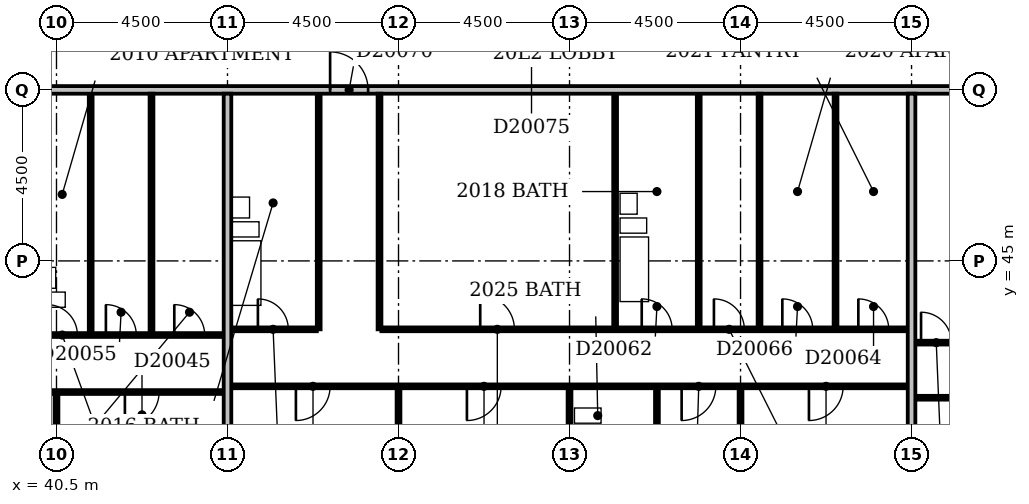
"""IFC4 building model, lengths in metres.
Left out: names, types, materials, properties, quantities, classifications, styles, units other than length and angle.
Written with IfcOpenShell. Run it as: python <this file> out.ifc"""

import sys

from ifc_helpers import new_model, si_unit, direction, frame, frame_2d, origin, place, context, subcontext, project, spatial, rectangle, extrude, element, fill, save


model = new_model("IFC4")
c1 = context("Model", 3, precision=1e-05, world=origin(), true_north=direction((0.0, 1.0)))
c2 = subcontext(c1, "Body", "Model", "MODEL_VIEW")
j1 = project(units=[si_unit("LENGTHUNIT", "METRE"), si_unit("PLANEANGLEUNIT", "RADIAN")], contexts=[c1])
p1 = place(None, origin())
s1 = spatial("IfcSite", under=j1, at=p1, CompositionType="ELEMENT")
p2 = place(p1, origin())
s2 = spatial("IfcBuilding", under=s1, at=p2, CompositionType="ELEMENT")
p3 = place(p2, frame((0.0, 0.0, 83.0)))
s3 = spatial("IfcBuildingStorey", under=s2, at=p3, CompositionType="ELEMENT", Elevation=83.0)
p4 = place(p3, frame((40.5, 36.6, 0.0), z_axis=(0.0, 0.0, 1.0), x_axis=(0.0, 1.0, 0.0)))
e1 = element("IfcWall", 1, at=p4, inside=s3, PredefinedType="PARTITIONING", context=c2, shape_type="SweptSolid", body=[
    extrude(rectangle(XDim=4.9, YDim=0.1, at=frame_2d((2.45, 0.0))), origin(), (0.0, 0.0, 1.0), 3.3),
])
p5 = place(p3, frame((45.0, 36.6, 0.0), z_axis=(0.0, 0.0, 1.0), x_axis=(0.0, 1.0, 0.0)))
e2 = element("IfcWall", 2, at=p5, inside=s3, PredefinedType="PARTITIONING", context=c2, shape_type="SweptSolid", body=[
    extrude(rectangle(XDim=12.8, YDim=0.2, at=frame_2d((6.4, 0.0))), origin(), (0.0, 0.0, 1.0), 2.6),
])
p6 = place(p3, frame((49.5, 36.6, 0.0), z_axis=(0.0, 0.0, 1.0), x_axis=(0.0, 1.0, 0.0)))
e3 = element("IfcWall", 3, at=p6, inside=s3, PredefinedType="PARTITIONING", context=c2, shape_type="SweptSolid", body=[
    extrude(rectangle(XDim=5.05, YDim=0.1, at=frame_2d((2.525, 0.0))), origin(), (0.0, 0.0, 1.0), 3.3),
])
p7 = place(p3, frame((54.0, 36.6, 0.0), z_axis=(0.0, 0.0, 1.0), x_axis=(0.0, 1.0, 0.0)))
e4 = element("IfcWall", 4, at=p7, inside=s3, PredefinedType="PARTITIONING", context=c2, shape_type="SweptSolid", body=[
    extrude(rectangle(XDim=5.05, YDim=0.1, at=frame_2d((2.525, 0.0))), origin(), (0.0, 0.0, 1.0), 2.6),
])
p8 = place(p3, frame((58.5, 36.6, 0.0), z_axis=(0.0, 0.0, 1.0), x_axis=(0.0, 1.0, 0.0)))
e5 = element("IfcWall", 5, at=p8, inside=s3, PredefinedType="PARTITIONING", context=c2, shape_type="SweptSolid", body=[
    extrude(rectangle(XDim=5.05, YDim=0.1, at=frame_2d((2.525, 0.0))), origin(), (0.0, 0.0, 1.0), 3.3),
])
p9 = place(p3, frame((63.0, 36.6, 0.0), z_axis=(0.0, 0.0, 1.0), x_axis=(0.0, 1.0, 0.0)))
e6 = element("IfcWall", 6, at=p9, inside=s3, PredefinedType="PARTITIONING", context=c2, shape_type="SweptSolid", body=[
    extrude(rectangle(XDim=12.8, YDim=0.2, at=frame_2d((6.4, 0.0))), origin(), (0.0, 0.0, 1.0), 2.4),
])
p10 = place(p3, frame((56.3, 38.8, 0.0), z_axis=(0.0, 0.0, 1.0), x_axis=(0.0, 1.0, 0.0)))
e7 = element("IfcWall", 7, at=p10, inside=s3, PredefinedType="PLUMBINGWALL", context=c2, shape_type="SweptSolid", body=[
    extrude(rectangle(XDim=2.85, YDim=0.1, at=frame_2d((1.425, 0.0))), origin(), (0.0, 0.0, 1.0), 3.3),
])
p11 = place(p10, frame((1.05, 0.0, 0.0)))
e8 = element("IfcOpeningElement", 8, at=p11, cuts=e7, PredefinedType="OPENING", context=c2, shape_type="SweptSolid", body=[
    extrude(rectangle(XDim=0.8, YDim=2.1, at=frame_2d((0.4, 1.05))), frame((0.0, 0.062, 0.0), z_axis=(0.0, -1.0, 0.0), x_axis=(1.0, 0.0, 0.0)), (0.0, 0.0, 1.0), 0.124),
])
p12 = place(p3, frame((63.1, 41.4, 0.0), z_axis=(0.0, 0.0, 1.0), x_axis=(1.0, 0.0, 0.0)))
e9 = element("IfcWall", 9, at=p12, inside=s3, PredefinedType="PARTITIONING", context=c2, shape_type="SweptSolid", body=[
    extrude(rectangle(XDim=5.0, YDim=0.1, at=frame_2d((2.5, 0.0))), origin(), (0.0, 0.0, 1.0), 3.3),
])
p13 = place(p12, frame((1.7, 0.0, 0.0)))
e10 = element("IfcOpeningElement", 10, at=p13, cuts=e9, PredefinedType="OPENING", context=c2, shape_type="SweptSolid", body=[
    extrude(rectangle(XDim=0.9, YDim=2.1, at=frame_2d((0.45, 1.05))), frame((0.0, 0.062, 0.0), z_axis=(0.0, -1.0, 0.0), x_axis=(1.0, 0.0, 0.0)), (0.0, 0.0, 1.0), 0.124),
])
p14 = place(p3, frame((31.6, 41.55, 0.0), z_axis=(0.0, 0.0, 1.0), x_axis=(1.0, 0.0, 0.0)))
e11 = element("IfcWall", 11, at=p14, inside=s3, PredefinedType="PARTITIONING", context=c2, shape_type="SweptSolid", body=[
    extrude(rectangle(XDim=13.3, YDim=0.1, at=frame_2d((6.65, 0.0))), origin(), (0.0, 0.0, 1.0), 3.3),
])
p15 = place(p14, frame((3.9, 0.0, 0.0)))
e12 = element("IfcOpeningElement", 12, at=p15, cuts=e11, PredefinedType="OPENING", context=c2, shape_type="SweptSolid", body=[
    extrude(rectangle(XDim=0.9, YDim=2.1, at=frame_2d((0.45, 1.05))), frame((0.0, 0.062, 0.0), z_axis=(0.0, -1.0, 0.0), x_axis=(1.0, 0.0, 0.0)), (0.0, 0.0, 1.0), 0.124),
])
p16 = place(p14, frame((10.7, 0.0, 0.0)))
e13 = element("IfcOpeningElement", 13, at=p16, cuts=e11, PredefinedType="OPENING", context=c2, shape_type="SweptSolid", body=[
    extrude(rectangle(XDim=0.9, YDim=2.1, at=frame_2d((0.45, 1.05))), frame((0.0, 0.062, 0.0), z_axis=(0.0, -1.0, 0.0), x_axis=(1.0, 0.0, 0.0)), (0.0, 0.0, 1.0), 0.124),
])
p17 = place(p3, frame((45.1, 41.7, 0.0), z_axis=(0.0, 0.0, 1.0), x_axis=(1.0, 0.0, 0.0)))
e14 = element("IfcWall", 14, at=p17, inside=s3, PredefinedType="PARTITIONING", context=c2, shape_type="SweptSolid", body=[
    extrude(rectangle(XDim=17.8, YDim=0.1, at=frame_2d((8.9, 0.0))), origin(), (0.0, 0.0, 1.0), 3.3),
])
p18 = place(p17, frame((1.7, 0.0, 0.0)))
e15 = element("IfcOpeningElement", 15, at=p18, cuts=e14, PredefinedType="OPENING", context=c2, shape_type="SweptSolid", body=[
    extrude(rectangle(XDim=0.9, YDim=2.1, at=frame_2d((0.45, 1.05))), frame((0.0, 0.062, 0.0), z_axis=(0.0, -1.0, 0.0), x_axis=(1.0, 0.0, 0.0)), (0.0, 0.0, 1.0), 0.124),
])
p19 = place(p17, frame((6.2, 0.0, 0.0)))
e16 = element("IfcOpeningElement", 16, at=p19, cuts=e14, PredefinedType="OPENING", context=c2, shape_type="SweptSolid", body=[
    extrude(rectangle(XDim=0.9, YDim=2.1, at=frame_2d((0.45, 1.05))), frame((0.0, 0.062, 0.0), z_axis=(0.0, -1.0, 0.0), x_axis=(1.0, 0.0, 0.0)), (0.0, 0.0, 1.0), 0.124),
])
p20 = place(p17, frame((11.85, 0.0, 0.0)))
e17 = element("IfcOpeningElement", 17, at=p20, cuts=e14, PredefinedType="OPENING", context=c2, shape_type="SweptSolid", body=[
    extrude(rectangle(XDim=0.9, YDim=2.1, at=frame_2d((0.45, 1.05))), frame((0.0, 0.062, 0.0), z_axis=(0.0, -1.0, 0.0), x_axis=(1.0, 0.0, 0.0)), (0.0, 0.0, 1.0), 0.124),
])
p21 = place(p17, frame((15.2, 0.0, 0.0)))
e18 = element("IfcOpeningElement", 18, at=p21, cuts=e14, PredefinedType="OPENING", context=c2, shape_type="SweptSolid", body=[
    extrude(rectangle(XDim=0.9, YDim=2.1, at=frame_2d((0.45, 1.05))), frame((0.0, 0.062, 0.0), z_axis=(0.0, -1.0, 0.0), x_axis=(1.0, 0.0, 0.0)), (0.0, 0.0, 1.0), 0.124),
])
p22 = place(p3, frame((63.1, 42.85, 0.0), z_axis=(0.0, 0.0, 1.0), x_axis=(1.0, 0.0, 0.0)))
e19 = element("IfcWall", 19, at=p22, inside=s3, PredefinedType="PARTITIONING", context=c2, shape_type="SweptSolid", body=[
    extrude(rectangle(XDim=1.15, YDim=0.1, at=frame_2d((0.575, 0.0))), origin(), (0.0, 0.0, 1.0), 3.3),
])
p23 = place(p22, frame((0.15, 0.0, 0.0)))
e20 = element("IfcOpeningElement", 20, at=p23, cuts=e19, PredefinedType="OPENING", context=c2, shape_type="SweptSolid", body=[
    extrude(rectangle(XDim=0.8, YDim=2.1, at=frame_2d((0.4, 1.05))), frame((0.0, 0.062, 0.0), z_axis=(0.0, -1.0, 0.0), x_axis=(1.0, 0.0, 0.0)), (0.0, 0.0, 1.0), 0.124),
])
p24 = place(p3, frame((33.15, 43.05, 0.0), z_axis=(0.0, 0.0, 1.0), x_axis=(1.0, 0.0, 0.0)))
e21 = element("IfcWall", 21, at=p24, inside=s3, PredefinedType="PARTITIONING", context=c2, shape_type="SweptSolid", body=[
    extrude(rectangle(XDim=11.75, YDim=0.1, at=frame_2d((5.875, 0.0))), origin(), (0.0, 0.0, 1.0), 3.3),
])
p25 = place(p24, frame((5.15, 0.0, 0.0)))
e22 = element("IfcOpeningElement", 22, at=p25, cuts=e21, PredefinedType="OPENING", context=c2, shape_type="SweptSolid", body=[
    extrude(rectangle(XDim=0.8, YDim=2.1, at=frame_2d((0.4, 1.05))), frame((0.0, 0.062, 0.0), z_axis=(0.0, -1.0, 0.0), x_axis=(1.0, 0.0, 0.0)), (0.0, 0.0, 1.0), 0.124),
])
p26 = place(p24, frame((1.7, 0.0, 0.0)))
e23 = element("IfcOpeningElement", 23, at=p26, cuts=e21, PredefinedType="OPENING", context=c2, shape_type="SweptSolid", body=[
    extrude(rectangle(XDim=0.9, YDim=2.1, at=frame_2d((0.45, 1.05))), frame((0.0, 0.062, 0.0), z_axis=(0.0, -1.0, 0.0), x_axis=(1.0, 0.0, 0.0)), (0.0, 0.0, 1.0), 0.124),
])
p27 = place(p24, frame((8.65, 0.0, 0.0)))
e24 = element("IfcOpeningElement", 24, at=p27, cuts=e21, PredefinedType="OPENING", context=c2, shape_type="SweptSolid", body=[
    extrude(rectangle(XDim=0.8, YDim=2.1, at=frame_2d((0.4, 1.05))), frame((0.0, 0.062, 0.0), z_axis=(0.0, -1.0, 0.0), x_axis=(1.0, 0.0, 0.0)), (0.0, 0.0, 1.0), 0.124),
])
p28 = place(p24, frame((10.45, 0.0, 0.0)))
e25 = element("IfcOpeningElement", 25, at=p28, cuts=e21, PredefinedType="OPENING", context=c2, shape_type="SweptSolid", body=[
    extrude(rectangle(XDim=0.8, YDim=2.1, at=frame_2d((0.4, 1.05))), frame((0.0, 0.062, 0.0), z_axis=(0.0, -1.0, 0.0), x_axis=(1.0, 0.0, 0.0)), (0.0, 0.0, 1.0), 0.124),
])
p29 = place(p24, frame((7.1, 0.0, 0.0)))
e26 = element("IfcOpeningElement", 26, at=p29, cuts=e21, PredefinedType="OPENING", context=c2, shape_type="SweptSolid", body=[
    extrude(rectangle(XDim=0.8, YDim=2.1, at=frame_2d((0.4, 1.05))), frame((0.0, 0.062, 0.0), z_axis=(0.0, -1.0, 0.0), x_axis=(1.0, 0.0, 0.0)), (0.0, 0.0, 1.0), 0.124),
])
p30 = place(p3, frame((41.4, 43.1, 0.0), z_axis=(0.0, 0.0, 1.0), x_axis=(0.0, 1.0, 0.0)))
e27 = element("IfcWall", 27, at=p30, inside=s3, PredefinedType="PLUMBINGWALL", context=c2, shape_type="SweptSolid", body=[
    extrude(rectangle(XDim=6.3, YDim=0.1, at=frame_2d((3.15, 0.0))), origin(), (0.0, 0.0, 1.0), 3.3),
])
p31 = place(p3, frame((43.0, 43.1, 0.0), z_axis=(0.0, 0.0, 1.0), x_axis=(0.0, 1.0, 0.0)))
e28 = element("IfcWall", 28, at=p31, inside=s3, PredefinedType="PARTITIONING", context=c2, shape_type="SweptSolid", body=[
    extrude(rectangle(XDim=6.3, YDim=0.1, at=frame_2d((3.15, 0.0))), origin(), (0.0, 0.0, 1.0), 3.3),
])
p32 = place(p3, frame((45.1, 43.2, 0.0), z_axis=(0.0, 0.0, 1.0), x_axis=(1.0, 0.0, 0.0)))
e29 = element("IfcWall", 29, at=p32, inside=s3, PredefinedType="PARTITIONING", context=c2, shape_type="SweptSolid", body=[
    extrude(rectangle(XDim=2.25, YDim=0.1, at=frame_2d((1.125, 0.0))), origin(), (0.0, 0.0, 1.0), 3.3),
])
p33 = place(p32, frame((0.7, 0.0, 0.0)))
e30 = element("IfcOpeningElement", 30, at=p33, cuts=e29, PredefinedType="OPENING", context=c2, shape_type="SweptSolid", body=[
    extrude(rectangle(XDim=0.8, YDim=2.1, at=frame_2d((0.4, 1.05))), frame((0.0, 0.062, 0.0), z_axis=(0.0, -1.0, 0.0), x_axis=(1.0, 0.0, 0.0)), (0.0, 0.0, 1.0), 0.124),
])
p34 = place(p3, frame((47.4, 43.2, 0.0), z_axis=(0.0, 0.0, 1.0), x_axis=(0.0, 1.0, 0.0)))
e31 = element("IfcWall", 31, at=p34, inside=s3, PredefinedType="PLUMBINGWALL", context=c2, shape_type="SweptSolid", body=[
    extrude(rectangle(XDim=6.2, YDim=0.1, at=frame_2d((3.1, 0.0))), origin(), (0.0, 0.0, 1.0), 3.3),
])
p35 = place(p3, frame((49.0, 43.2, 0.0), z_axis=(0.0, 0.0, 1.0), x_axis=(0.0, 1.0, 0.0)))
e32 = element("IfcWall", 32, at=p35, inside=s3, PredefinedType="PARTITIONING", context=c2, shape_type="SweptSolid", body=[
    extrude(rectangle(XDim=6.2, YDim=0.1, at=frame_2d((3.1, 0.0))), origin(), (0.0, 0.0, 1.0), 3.3),
])
p36 = place(p3, frame((49.05, 43.2, 0.0), z_axis=(0.0, 0.0, 1.0), x_axis=(1.0, 0.0, 0.0)))
e33 = element("IfcWall", 33, at=p36, inside=s3, PredefinedType="PARTITIONING", context=c2, shape_type="SweptSolid", body=[
    extrude(rectangle(XDim=13.85, YDim=0.1, at=frame_2d((6.925, 0.0))), origin(), (0.0, 0.0, 1.0), 3.3),
])
p37 = place(p36, frame((6.85, 0.0, 0.0)))
e34 = element("IfcOpeningElement", 34, at=p37, cuts=e33, PredefinedType="OPENING", context=c2, shape_type="SweptSolid", body=[
    extrude(rectangle(XDim=0.8, YDim=2.1, at=frame_2d((0.4, 1.05))), frame((0.0, 0.062, 0.0), z_axis=(0.0, -1.0, 0.0), x_axis=(1.0, 0.0, 0.0)), (0.0, 0.0, 1.0), 0.124),
])
p38 = place(p36, frame((2.6, 0.0, 0.0)))
e35 = element("IfcOpeningElement", 35, at=p38, cuts=e33, PredefinedType="OPENING", context=c2, shape_type="SweptSolid", body=[
    extrude(rectangle(XDim=0.9, YDim=2.1, at=frame_2d((0.45, 1.05))), frame((0.0, 0.062, 0.0), z_axis=(0.0, -1.0, 0.0), x_axis=(1.0, 0.0, 0.0)), (0.0, 0.0, 1.0), 0.124),
])
p39 = place(p36, frame((12.55, 0.0, 0.0)))
e36 = element("IfcOpeningElement", 36, at=p39, cuts=e33, PredefinedType="OPENING", context=c2, shape_type="SweptSolid", body=[
    extrude(rectangle(XDim=0.8, YDim=2.1, at=frame_2d((0.4, 1.05))), frame((0.0, 0.062, 0.0), z_axis=(0.0, -1.0, 0.0), x_axis=(1.0, 0.0, 0.0)), (0.0, 0.0, 1.0), 0.124),
])
p40 = place(p36, frame((8.75, 0.0, 0.0)))
e37 = element("IfcOpeningElement", 37, at=p40, cuts=e33, PredefinedType="OPENING", context=c2, shape_type="SweptSolid", body=[
    extrude(rectangle(XDim=0.8, YDim=2.1, at=frame_2d((0.4, 1.05))), frame((0.0, 0.062, 0.0), z_axis=(0.0, -1.0, 0.0), x_axis=(1.0, 0.0, 0.0)), (0.0, 0.0, 1.0), 0.124),
])
p41 = place(p36, frame((10.55, 0.0, 0.0)))
e38 = element("IfcOpeningElement", 38, at=p41, cuts=e33, PredefinedType="OPENING", context=c2, shape_type="SweptSolid", body=[
    extrude(rectangle(XDim=0.8, YDim=2.1, at=frame_2d((0.4, 1.05))), frame((0.0, 0.062, 0.0), z_axis=(0.0, -1.0, 0.0), x_axis=(1.0, 0.0, 0.0)), (0.0, 0.0, 1.0), 0.124),
])
for number, where, z_axis, x_axis in (
    (39, (55.2, 43.25, 0.0), (0.0, 0.0, 1.0), (0.0, 1.0, 0.0)),
    (40, (57.4, 43.25, 0.0), (0.0, 0.0, 1.0), (0.0, 1.0, 0.0)),
):
    element("IfcWall", number, at=place(p3, frame(where, z_axis=z_axis, x_axis=x_axis)), inside=s3, PredefinedType="PLUMBINGWALL", context=c2, shape_type="SweptSolid", body=[
        extrude(rectangle(XDim=6.15, YDim=0.1, at=frame_2d((3.075, 0.0))), origin(), (0.0, 0.0, 1.0), 3.3),
    ])
for number, where, z_axis, x_axis in (
    (41, (59.0, 43.25, 0.0), (0.0, 0.0, 1.0), (0.0, 1.0, 0.0)),
    (42, (61.0, 43.25, 0.0), (0.0, 0.0, 1.0), (0.0, 1.0, 0.0)),
):
    element("IfcWall", number, at=place(p3, frame(where, z_axis=z_axis, x_axis=x_axis)), inside=s3, PredefinedType="PARTITIONING", context=c2, shape_type="SweptSolid", body=[
        extrude(rectangle(XDim=6.15, YDim=0.1, at=frame_2d((3.075, 0.0))), origin(), (0.0, 0.0, 1.0), 3.3),
    ])
p42 = place(p3, frame((9.1, 49.5, 0.0), z_axis=(0.0, 0.0, 1.0), x_axis=(1.0, 0.0, 0.0)))
e43 = element("IfcWall", 43, at=p42, inside=s3, PredefinedType="PARTITIONING", context=c2, shape_type="SweptSolid", body=[
    extrude(rectangle(XDim=57.8, YDim=0.2, at=frame_2d((28.9, 0.0))), origin(), (0.0, 0.0, 1.0), 3.3),
])
p43 = place(p42, frame((13.7, 0.0, 0.0)))
e44 = element("IfcOpeningElement", 44, at=p43, cuts=e43, PredefinedType="OPENING", context=c2, shape_type="SweptSolid", body=[
    extrude(rectangle(XDim=1.0, YDim=2.1, at=frame_2d((0.5, 1.05))), frame((0.0, 0.112, 0.0), z_axis=(0.0, -1.0, 0.0), x_axis=(1.0, 0.0, 0.0)), (0.0, 0.0, 1.0), 0.224),
])
p44 = place(p42, frame((22.7, 0.0, 0.0)))
e45 = element("IfcOpeningElement", 45, at=p44, cuts=e43, PredefinedType="OPENING", context=c2, shape_type="SweptSolid", body=[
    extrude(rectangle(XDim=1.0, YDim=2.1, at=frame_2d((0.5, 1.05))), frame((0.0, 0.112, 0.0), z_axis=(0.0, -1.0, 0.0), x_axis=(1.0, 0.0, 0.0)), (0.0, 0.0, 1.0), 0.224),
])
p45 = place(p42, frame((38.6, 0.0, 0.0)))
e46 = element("IfcOpeningElement", 46, at=p45, cuts=e43, PredefinedType="OPENING", context=c2, shape_type="SweptSolid", body=[
    extrude(rectangle(XDim=1.0, YDim=2.1, at=frame_2d((0.5, 1.05))), frame((0.0, 0.112, 0.0), z_axis=(0.0, -1.0, 0.0), x_axis=(1.0, 0.0, 0.0)), (0.0, 0.0, 1.0), 0.224),
])
p46 = place(p42, frame((55.45, 0.0, 0.0)))
e47 = element("IfcOpeningElement", 47, at=p46, cuts=e43, PredefinedType="OPENING", context=c2, shape_type="SweptSolid", body=[
    extrude(rectangle(XDim=1.0, YDim=2.1, at=frame_2d((0.5, 1.05))), frame((0.0, 0.112, 0.0), z_axis=(0.0, -1.0, 0.0), x_axis=(1.0, 0.0, 0.0)), (0.0, 0.0, 1.0), 0.224),
])
p47 = place(p42, frame((6.15, 0.0, 0.0)))
e48 = element("IfcOpeningElement", 48, at=p47, cuts=e43, PredefinedType="OPENING", context=c2, shape_type="SweptSolid", body=[
    extrude(rectangle(XDim=0.9, YDim=2.1, at=frame_2d((0.45, 1.05))), frame((0.0, 0.112, 0.0), z_axis=(0.0, -1.0, 0.0), x_axis=(1.0, 0.0, 0.0)), (0.0, 0.0, 1.0), 0.224),
])
p48 = place(p16, frame((0.9, 0.0, 0.0), z_axis=(0.0, 0.0, 1.0), x_axis=(-1.0, 0.0, 0.0)))
e49 = element("IfcDoor", 49, at=p48, inside=s3, OperationType="SINGLE_SWING_RIGHT", PredefinedType="DOOR", context=c2, shape_type="SweptSolid", body=[
    extrude(rectangle(XDim=0.9, YDim=2.1, at=frame_2d((0.45, 1.05))), frame((0.0, 0.025, 0.0), z_axis=(0.0, -1.0, 0.0), x_axis=(1.0, 0.0, 0.0)), (0.0, 0.0, 1.0), 0.05),
])
fill(e13, e49)
p49 = place(p18, frame((0.9, 0.0, 0.0), z_axis=(0.0, 0.0, 1.0), x_axis=(-1.0, 0.0, 0.0)))
e50 = element("IfcDoor", 50, at=p49, inside=s3, OperationType="SINGLE_SWING_RIGHT", PredefinedType="DOOR", context=c2, shape_type="SweptSolid", body=[
    extrude(rectangle(XDim=0.9, YDim=2.1, at=frame_2d((0.45, 1.05))), frame((0.0, 0.025, 0.0), z_axis=(0.0, -1.0, 0.0), x_axis=(1.0, 0.0, 0.0)), (0.0, 0.0, 1.0), 0.05),
])
fill(e15, e50)
p50 = place(p19, frame((0.9, 0.0, 0.0), z_axis=(0.0, 0.0, 1.0), x_axis=(-1.0, 0.0, 0.0)))
e51 = element("IfcDoor", 51, at=p50, inside=s3, OperationType="SINGLE_SWING_RIGHT", PredefinedType="DOOR", context=c2, shape_type="SweptSolid", body=[
    extrude(rectangle(XDim=0.9, YDim=2.1, at=frame_2d((0.45, 1.05))), frame((0.0, 0.025, 0.0), z_axis=(0.0, -1.0, 0.0), x_axis=(1.0, 0.0, 0.0)), (0.0, 0.0, 1.0), 0.05),
])
fill(e16, e51)
p51 = place(p20, frame((0.9, 0.0, 0.0), z_axis=(0.0, 0.0, 1.0), x_axis=(-1.0, 0.0, 0.0)))
e52 = element("IfcDoor", 52, at=p51, inside=s3, OperationType="SINGLE_SWING_RIGHT", PredefinedType="DOOR", context=c2, shape_type="SweptSolid", body=[
    extrude(rectangle(XDim=0.9, YDim=2.1, at=frame_2d((0.45, 1.05))), frame((0.0, 0.025, 0.0), z_axis=(0.0, -1.0, 0.0), x_axis=(1.0, 0.0, 0.0)), (0.0, 0.0, 1.0), 0.05),
])
fill(e17, e52)
p52 = place(p21, frame((0.9, 0.0, 0.0), z_axis=(0.0, 0.0, 1.0), x_axis=(-1.0, 0.0, 0.0)))
e53 = element("IfcDoor", 53, at=p52, inside=s3, OperationType="SINGLE_SWING_RIGHT", PredefinedType="DOOR", context=c2, shape_type="SweptSolid", body=[
    extrude(rectangle(XDim=0.9, YDim=2.1, at=frame_2d((0.45, 1.05))), frame((0.0, 0.025, 0.0), z_axis=(0.0, -1.0, 0.0), x_axis=(1.0, 0.0, 0.0)), (0.0, 0.0, 1.0), 0.05),
])
fill(e18, e53)
p53 = place(p23, origin())
e54 = element("IfcDoor", 54, at=p53, inside=s3, OperationType="SINGLE_SWING_LEFT", PredefinedType="DOOR", context=c2, shape_type="SweptSolid", body=[
    extrude(rectangle(XDim=0.8, YDim=2.1, at=frame_2d((0.4, 1.05))), frame((0.0, 0.025, 0.0), z_axis=(0.0, -1.0, 0.0), x_axis=(1.0, 0.0, 0.0)), (0.0, 0.0, 1.0), 0.05),
])
fill(e20, e54)
p54 = place(p27, origin())
e55 = element("IfcDoor", 55, at=p54, inside=s3, OperationType="SINGLE_SWING_LEFT", PredefinedType="DOOR", context=c2, shape_type="SweptSolid", body=[
    extrude(rectangle(XDim=0.8, YDim=2.1, at=frame_2d((0.4, 1.05))), frame((0.0, 0.025, 0.0), z_axis=(0.0, -1.0, 0.0), x_axis=(1.0, 0.0, 0.0)), (0.0, 0.0, 1.0), 0.05),
])
fill(e24, e55)
p55 = place(p28, origin())
e56 = element("IfcDoor", 56, at=p55, inside=s3, OperationType="SINGLE_SWING_LEFT", PredefinedType="DOOR", context=c2, shape_type="SweptSolid", body=[
    extrude(rectangle(XDim=0.8, YDim=2.1, at=frame_2d((0.4, 1.05))), frame((0.0, 0.025, 0.0), z_axis=(0.0, -1.0, 0.0), x_axis=(1.0, 0.0, 0.0)), (0.0, 0.0, 1.0), 0.05),
])
fill(e25, e56)
p56 = place(p29, origin())
e57 = element("IfcDoor", 57, at=p56, inside=s3, OperationType="SINGLE_SWING_LEFT", PredefinedType="DOOR", context=c2, shape_type="SweptSolid", body=[
    extrude(rectangle(XDim=0.8, YDim=2.1, at=frame_2d((0.4, 1.05))), frame((0.0, 0.025, 0.0), z_axis=(0.0, -1.0, 0.0), x_axis=(1.0, 0.0, 0.0)), (0.0, 0.0, 1.0), 0.05),
])
fill(e26, e57)
p57 = place(p33, origin())
e58 = element("IfcDoor", 58, at=p57, inside=s3, OperationType="SINGLE_SWING_LEFT", PredefinedType="DOOR", context=c2, shape_type="SweptSolid", body=[
    extrude(rectangle(XDim=0.8, YDim=2.1, at=frame_2d((0.4, 1.05))), frame((0.0, 0.025, 0.0), z_axis=(0.0, -1.0, 0.0), x_axis=(1.0, 0.0, 0.0)), (0.0, 0.0, 1.0), 0.05),
])
fill(e30, e58)
p58 = place(p37, origin())
e59 = element("IfcDoor", 59, at=p58, inside=s3, OperationType="SINGLE_SWING_LEFT", PredefinedType="DOOR", context=c2, shape_type="SweptSolid", body=[
    extrude(rectangle(XDim=0.8, YDim=2.1, at=frame_2d((0.4, 1.05))), frame((0.0, 0.025, 0.0), z_axis=(0.0, -1.0, 0.0), x_axis=(1.0, 0.0, 0.0)), (0.0, 0.0, 1.0), 0.05),
])
fill(e34, e59)
p59 = place(p38, origin())
e60 = element("IfcDoor", 60, at=p59, inside=s3, OperationType="SINGLE_SWING_LEFT", PredefinedType="DOOR", context=c2, shape_type="SweptSolid", body=[
    extrude(rectangle(XDim=0.9, YDim=2.1, at=frame_2d((0.45, 1.05))), frame((0.0, 0.025, 0.0), z_axis=(0.0, -1.0, 0.0), x_axis=(1.0, 0.0, 0.0)), (0.0, 0.0, 1.0), 0.05),
])
fill(e35, e60)
p60 = place(p39, origin())
e61 = element("IfcDoor", 61, at=p60, inside=s3, OperationType="SINGLE_SWING_LEFT", PredefinedType="DOOR", context=c2, shape_type="SweptSolid", body=[
    extrude(rectangle(XDim=0.8, YDim=2.1, at=frame_2d((0.4, 1.05))), frame((0.0, 0.025, 0.0), z_axis=(0.0, -1.0, 0.0), x_axis=(1.0, 0.0, 0.0)), (0.0, 0.0, 1.0), 0.05),
])
fill(e36, e61)
p61 = place(p40, origin())
e62 = element("IfcDoor", 62, at=p61, inside=s3, OperationType="SINGLE_SWING_LEFT", PredefinedType="DOOR", context=c2, shape_type="SweptSolid", body=[
    extrude(rectangle(XDim=0.8, YDim=2.1, at=frame_2d((0.4, 1.05))), frame((0.0, 0.025, 0.0), z_axis=(0.0, -1.0, 0.0), x_axis=(1.0, 0.0, 0.0)), (0.0, 0.0, 1.0), 0.05),
])
fill(e37, e62)
p62 = place(p41, origin())
e63 = element("IfcDoor", 63, at=p62, inside=s3, OperationType="SINGLE_SWING_LEFT", PredefinedType="DOOR", context=c2, shape_type="SweptSolid", body=[
    extrude(rectangle(XDim=0.8, YDim=2.1, at=frame_2d((0.4, 1.05))), frame((0.0, 0.025, 0.0), z_axis=(0.0, -1.0, 0.0), x_axis=(1.0, 0.0, 0.0)), (0.0, 0.0, 1.0), 0.05),
])
fill(e38, e63)
p63 = place(p45, origin())
e64 = element("IfcDoor", 64, at=p63, inside=s3, OperationType="SINGLE_SWING_LEFT", PredefinedType="DOOR", context=c2, shape_type="SweptSolid", body=[
    extrude(rectangle(XDim=1.0, YDim=2.1, at=frame_2d((0.5, 1.05))), frame((0.0, 0.025, 0.0), z_axis=(0.0, -1.0, 0.0), x_axis=(1.0, 0.0, 0.0)), (0.0, 0.0, 1.0), 0.05),
])
fill(e46, e64)
save(model, sys.argv[1])
